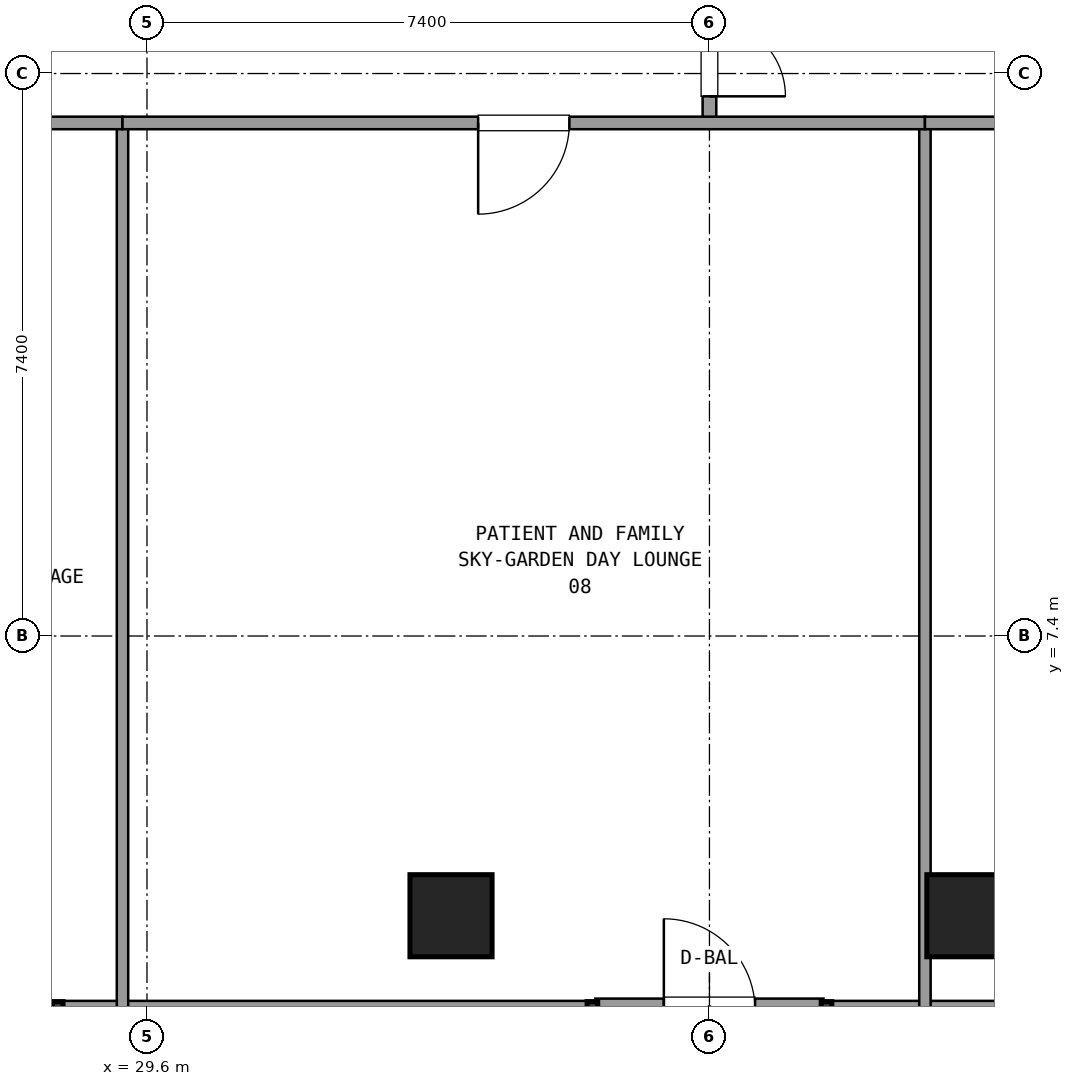
"""IFC4 building model, lengths in metres.
Left out: names, types, materials, properties, quantities, classifications, styles, units other than length and angle.
Written with IfcOpenShell. Run it as: python <this file> out.ifc"""

import sys

from ifc_helpers import new_model, si_unit, direction, frame, frame_2d, origin, origin_2d, place, context, subcontext, project, spatial, rectangle, extrude, element, fill, save


model = new_model("IFC4")
c1 = context("Model", 3, precision=1e-05, world=origin(), true_north=direction((0.0, 1.0)))
c2 = subcontext(c1, "Body", "Model", "MODEL_VIEW")
j1 = project(units=[si_unit("LENGTHUNIT", "METRE"), si_unit("PLANEANGLEUNIT", "RADIAN")], contexts=[c1])
p1 = place(None, origin())
s1 = spatial("IfcSite", under=j1, at=p1, CompositionType="ELEMENT")
p2 = place(p1, origin())
s2 = spatial("IfcBuilding", under=s1, at=p2, CompositionType="ELEMENT")
p3 = place(p2, frame((0.0, 0.0, 49.14)))
s3 = spatial("IfcBuildingStorey", under=s2, at=p3, CompositionType="ELEMENT", Elevation=49.14)
for number, where, z_axis, x_axis in (
    (1, (33.6, 3.72, 0.0), (0.0, 0.0, 1.0), (1.0, 0.0, 0.0)),
    (2, (40.4, 3.72, 0.0), (0.0, 0.0, 1.0), (1.0, 0.0, 0.0)),
):
    element("IfcColumn", number, at=place(p3, frame(where, z_axis=z_axis, x_axis=x_axis)), inside=s3, PredefinedType="COLUMN", context=c2, shape_type="SweptSolid", body=[
        extrude(rectangle(XDim=1.08, YDim=1.08, at=origin_2d()), origin(), (0.0, 0.0, 1.0), 3.6),
    ])
p4 = place(p3, frame((35.5, 2.48, 0.0), z_axis=(0.0, 0.0, 1.0), x_axis=(1.0, 0.0, 0.0)))
e3 = element("IfcWall", 3, at=p4, inside=s3, PredefinedType="SOLIDWALL", context=c2, shape_type="SweptSolid", body=[
    extrude(rectangle(XDim=3.0, YDim=0.3, at=frame_2d((1.5, 0.0))), origin(), (0.0, 0.0, 1.0), 2.65),
])
p5 = place(p4, frame((0.9, 0.0, 0.0)))
e4 = element("IfcOpeningElement", 4, at=p5, cuts=e3, PredefinedType="OPENING", context=c2, shape_type="SweptSolid", body=[
    extrude(rectangle(XDim=1.2, YDim=2.2, at=frame_2d((0.6, 1.1))), frame((0.0, 0.16, 0.0), z_axis=(0.0, -1.0, 0.0), x_axis=(1.0, 0.0, 0.0)), (0.0, 0.0, 1.0), 0.32),
])
for number, where, z_axis, x_axis in (
    (5, (14.355, 2.48, 0.0), (0.0, 0.0, 1.0), (1.0, 0.0, 0.0)),
    (6, (38.54, 2.48, 0.0), (0.0, 0.0, 1.0), (1.0, 0.0, 0.0)),
):
    element("IfcWall", number, at=place(p3, frame(where, z_axis=z_axis, x_axis=x_axis)), inside=s3, PredefinedType="SOLIDWALL", context=c2, shape_type="SweptSolid", body=[
        extrude(rectangle(XDim=21.105, YDim=0.24, at=frame_2d((10.552, 0.0))), origin(), (0.0, 0.0, 1.0), 0.85),
    ])
p6 = place(p3, frame((37.0, 14.15, 0.0), z_axis=(0.0, 0.0, 1.0), x_axis=(0.0, 1.0, 0.0)))
e7 = element("IfcWall", 7, at=p6, inside=s3, PredefinedType="PARTITIONING", context=c2, shape_type="SweptSolid", body=[
    extrude(rectangle(XDim=2.7, YDim=0.18, at=frame_2d((1.35, 0.0))), origin(), (0.0, 0.0, 1.0), 2.61),
])
p7 = place(p6, frame((0.35, 0.0, 0.0)))
e8 = element("IfcOpeningElement", 8, at=p7, cuts=e7, PredefinedType="OPENING", context=c2, shape_type="SweptSolid", body=[
    extrude(rectangle(XDim=2.0, YDim=2.2, at=frame_2d((1.0, 1.1))), frame((0.0, 0.1, 0.0), z_axis=(0.0, -1.0, 0.0), x_axis=(1.0, 0.0, 0.0)), (0.0, 0.0, 1.0), 0.2),
])
p8 = place(p3, frame((29.278, 14.15, 0.0), z_axis=(0.0, 0.0, 1.0), x_axis=(0.0, -1.0, 0.0)))
e9 = element("IfcWall", 9, at=p8, inside=s3, PredefinedType="PARTITIONING", context=c2, shape_type="SweptSolid", body=[
    extrude(rectangle(XDim=11.65, YDim=0.15, at=frame_2d((5.825, 0.0))), origin(), (0.0, 0.0, 1.0), 2.61),
])
p9 = place(p3, frame((25.2, 14.15, 0.0), z_axis=(0.0, 0.0, 1.0), x_axis=(1.0, 0.0, 0.0)))
e10 = element("IfcWall", 10, at=p9, inside=s3, PredefinedType="PARTITIONING", context=c2, shape_type="SweptSolid", body=[
    extrude(rectangle(XDim=4.078, YDim=0.165, at=frame_2d((2.039, 0.0))), origin(), (0.0, 0.0, 1.0), 2.61),
])
p10 = place(p9, frame((1.439, 0.0, 0.0)))
e11 = element("IfcOpeningElement", 11, at=p10, cuts=e10, PredefinedType="OPENING", context=c2, shape_type="SweptSolid", body=[
    extrude(rectangle(XDim=1.2, YDim=2.15, at=frame_2d((0.6, 1.075))), frame((0.0, 0.093, 0.0), z_axis=(0.0, -1.0, 0.0), x_axis=(1.0, 0.0, 0.0)), (0.0, 0.0, 1.0), 0.185),
])
p11 = place(p3, frame((39.835, 14.15, 0.0), z_axis=(0.0, 0.0, 1.0), x_axis=(0.0, -1.0, 0.0)))
e12 = element("IfcWall", 12, at=p11, inside=s3, PredefinedType="PARTITIONING", context=c2, shape_type="SweptSolid", body=[
    extrude(rectangle(XDim=11.65, YDim=0.15, at=frame_2d((5.825, 0.0))), origin(), (0.0, 0.0, 1.0), 2.61),
])
p12 = place(p3, frame((29.278, 14.15, 0.0), z_axis=(0.0, 0.0, 1.0), x_axis=(1.0, 0.0, 0.0)))
e13 = element("IfcWall", 13, at=p12, inside=s3, PredefinedType="PARTITIONING", context=c2, shape_type="SweptSolid", body=[
    extrude(rectangle(XDim=10.557, YDim=0.165, at=frame_2d((5.278, 0.0))), origin(), (0.0, 0.0, 1.0), 2.61),
])
p13 = place(p12, frame((4.679, 0.0, 0.0)))
e14 = element("IfcOpeningElement", 14, at=p13, cuts=e13, PredefinedType="OPENING", context=c2, shape_type="SweptSolid", body=[
    extrude(rectangle(XDim=1.2, YDim=2.15, at=frame_2d((0.6, 1.075))), frame((0.0, 0.093, 0.0), z_axis=(0.0, -1.0, 0.0), x_axis=(1.0, 0.0, 0.0)), (0.0, 0.0, 1.0), 0.185),
])
p14 = place(p3, frame((39.835, 14.15, 0.0), z_axis=(0.0, 0.0, 1.0), x_axis=(1.0, 0.0, 0.0)))
e15 = element("IfcWall", 15, at=p14, inside=s3, PredefinedType="PARTITIONING", context=c2, shape_type="SweptSolid", body=[
    extrude(rectangle(XDim=7.645, YDim=0.165, at=frame_2d((3.823, 0.0))), origin(), (0.0, 0.0, 1.0), 2.61),
])
p15 = place(p14, frame((3.222, 0.0, 0.0)))
e16 = element("IfcOpeningElement", 16, at=p15, cuts=e15, PredefinedType="OPENING", context=c2, shape_type="SweptSolid", body=[
    extrude(rectangle(XDim=1.2, YDim=2.15, at=frame_2d((0.6, 1.075))), frame((0.0, 0.093, 0.0), z_axis=(0.0, -1.0, 0.0), x_axis=(1.0, 0.0, 0.0)), (0.0, 0.0, 1.0), 0.185),
])
p16 = place(p7, frame((2.0, 0.0, 0.0), z_axis=(0.0, 0.0, 1.0), x_axis=(-1.0, 0.0, 0.0)))
e17 = element("IfcDoor", 17, at=p16, inside=s3, OperationType="DOUBLE_DOOR_SINGLE_SWING", PredefinedType="DOOR", context=c2, shape_type="SweptSolid", body=[
    extrude(rectangle(XDim=2.0, YDim=2.2, at=frame_2d((1.0, 1.1))), frame((0.0, 0.025, 0.0), z_axis=(0.0, -1.0, 0.0), x_axis=(1.0, 0.0, 0.0)), (0.0, 0.0, 1.0), 0.05),
])
fill(e8, e17)
p17 = place(p13, frame((1.2, 0.0, 0.0), z_axis=(0.0, 0.0, 1.0), x_axis=(-1.0, 0.0, 0.0)))
e18 = element("IfcDoor", 18, at=p17, inside=s3, OperationType="SINGLE_SWING_LEFT", PredefinedType="DOOR", context=c2, shape_type="SweptSolid", body=[
    extrude(rectangle(XDim=1.2, YDim=2.15, at=frame_2d((0.6, 1.075))), frame((0.0, 0.025, 0.0), z_axis=(0.0, -1.0, 0.0), x_axis=(1.0, 0.0, 0.0)), (0.0, 0.0, 1.0), 0.05),
])
fill(e14, e18)
save(model, sys.argv[1])
